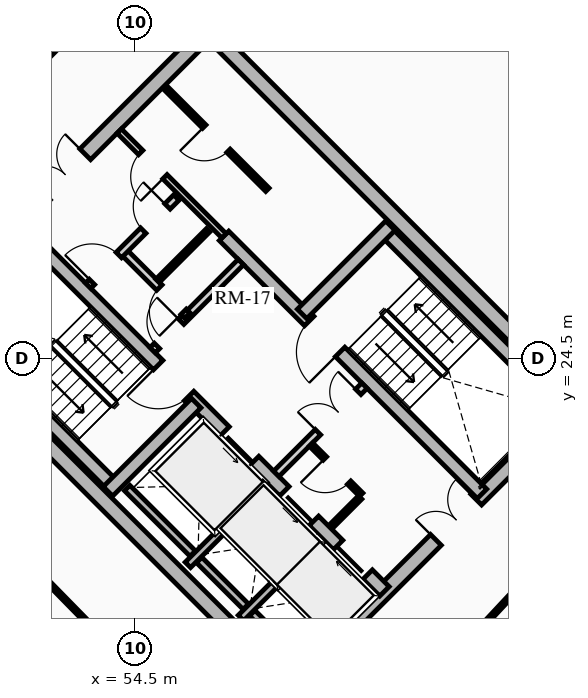
"""IFC4 building model, lengths in metres.
Left out: names, types, materials, properties, quantities, classifications, styles, units other than length and angle.
Written with IfcOpenShell. Run it as: python <this file> out.ifc"""

import sys

from ifc_helpers import new_model, si_unit, direction, frame, frame_2d, origin, place, context, subcontext, project, spatial, rectangle, extrude, source, transform, mapped, element, fill, save


model = new_model("IFC4")
c1 = context("Model", 3, precision=1e-05, world=origin(), true_north=direction((0.0, 1.0)))
c2 = subcontext(c1, "Body", "Model", "MODEL_VIEW")
j1 = project(units=[si_unit("LENGTHUNIT", "METRE"), si_unit("PLANEANGLEUNIT", "RADIAN")], contexts=[c1])
p1 = place(None, origin())
s1 = spatial("IfcSite", under=j1, at=p1, CompositionType="ELEMENT")
p2 = place(p1, origin())
s2 = spatial("IfcBuilding", under=s1, at=p2, CompositionType="ELEMENT")
p3 = place(p2, frame((0.0, 0.0, 186.52)))
s3 = spatial("IfcBuildingStorey", under=s2, at=p3, CompositionType="ELEMENT", Elevation=186.52)
for number, where, z_axis, x_axis in (
    (1, (58.702, 15.732, 0.0), (0.0, 0.0, 1.0), (-0.707, 0.707, 0.0)),
    (2, (66.268, 23.298, 0.0), (0.0, 0.0, 1.0), (-0.707, 0.707, 0.0)),
):
    element("IfcWall", number, at=place(p3, frame(where, z_axis=z_axis, x_axis=x_axis)), inside=s3, PredefinedType="SHEAR", context=c2, shape_type="SweptSolid", body=[
        extrude(rectangle(XDim=14.1, YDim=0.4, at=frame_2d((7.05, 0.0))), origin(), (0.0, 0.0, 1.0), 2.91),
    ])
p4 = place(p3, frame((58.561, 15.873, 0.0), z_axis=(0.0, 0.0, 1.0), x_axis=(0.707106781187, 0.707106781187, 0.0)))
e3 = element("IfcWall", 3, at=p4, inside=s3, PredefinedType="SHEAR", context=c2, shape_type="SweptSolid", body=[
    extrude(rectangle(XDim=10.7, YDim=0.4, at=frame_2d((5.35, 0.0))), origin(), (0.0, 0.0, 1.0), 2.91),
])
m1 = source(origin(), c2, "Body", "SweptSolid", [
    extrude(rectangle(XDim=1.5, YDim=2.02, at=frame_2d((0.75, 1.01))), frame((0.0, 0.21, 0.0), z_axis=(0.0, -1.0, 0.0), x_axis=(1.0, 0.0, 0.0)), (0.0, 0.0, 1.0), 0.42),
])
p5 = place(p4, frame((5.45, 0.0, 0.0)))
e4 = element("IfcOpeningElement", 4, at=p5, cuts=e3, PredefinedType="OPENING", context=c2, shape_type="MappedRepresentation", body=[
    mapped(m1, transform((0.0, 0.0, 0.0), x_axis=(1.0, 0.0, 0.0), y_axis=(0.0, 1.0, 0.0), z_axis=(0.0, 0.0, 1.0), scale=1.0)),
])
p6 = place(p3, frame((48.873, 25.561, 0.0), z_axis=(0.0, 0.0, 1.0), x_axis=(0.707106781187, 0.707106781187, 0.0)))
e5 = element("IfcWall", 5, at=p6, inside=s3, PredefinedType="SHEAR", context=c2, shape_type="SweptSolid", body=[
    extrude(rectangle(XDim=10.7, YDim=0.4, at=frame_2d((5.35, 0.0))), origin(), (0.0, 0.0, 1.0), 2.91),
])
p7 = place(p6, frame((4.6, 0.0, 0.0)))
e6 = element("IfcOpeningElement", 6, at=p7, cuts=e5, PredefinedType="OPENING", context=c2, shape_type="MappedRepresentation", body=[
    mapped(m1, transform((0.0, 0.0, 0.0), x_axis=(1.0, 0.0, 0.0), y_axis=(0.0, 1.0, 0.0), z_axis=(0.0, 0.0, 1.0), scale=1.0)),
])
p8 = place(p3, frame((61.06, 18.373, 0.0), z_axis=(0.0, 0.0, 1.0), x_axis=(-0.707106781187, 0.707106781187, 0.0)))
e7 = element("IfcWall", 7, at=p8, inside=s3, PredefinedType="SHEAR", context=c2, shape_type="SweptSolid", body=[
    extrude(rectangle(XDim=13.7, YDim=0.35, at=frame_2d((6.85, 0.0))), origin(), (0.0, 0.0, 1.0), 2.91),
])
m2 = source(origin(), c2, "Body", "SweptSolid", [
    extrude(rectangle(XDim=1.1, YDim=2.015, at=frame_2d((0.55, 1.007))), frame((0.0, 0.185, 0.0), z_axis=(0.0, -1.0, 0.0), x_axis=(1.0, 0.0, 0.0)), (0.0, 0.0, 1.0), 0.37),
])
p9 = place(p8, frame((4.85, 0.0, 0.0)))
e8 = element("IfcOpeningElement", 8, at=p9, cuts=e7, PredefinedType="OPENING", context=c2, shape_type="MappedRepresentation", body=[
    mapped(m2, transform((0.0, 0.0, 0.0), x_axis=(1.0, 0.0, 0.0), y_axis=(0.0, 1.0, 0.0), z_axis=(0.0, 0.0, 1.0), scale=1.0)),
])
p10 = place(p8, frame((0.625, 0.0, 0.0)))
e9 = element("IfcOpeningElement", 9, at=p10, cuts=e7, PredefinedType="OPENING", context=c2, shape_type="MappedRepresentation", body=[
    mapped(m2, transform((0.0, 0.0, 0.0), x_axis=(1.0, 0.0, 0.0), y_axis=(0.0, 1.0, 0.0), z_axis=(0.0, 0.0, 1.0), scale=1.0)),
])
p11 = place(p8, frame((2.625, 0.0, 0.0)))
e10 = element("IfcOpeningElement", 10, at=p11, cuts=e7, PredefinedType="OPENING", context=c2, shape_type="MappedRepresentation", body=[
    mapped(m2, transform((0.0, 0.0, 0.0), x_axis=(1.0, 0.0, 0.0), y_axis=(0.0, 1.0, 0.0), z_axis=(0.0, 0.0, 1.0), scale=1.0)),
])
m3 = source(origin(), c2, "Body", "SweptSolid", [
    extrude(rectangle(XDim=1.15, YDim=2.02, at=frame_2d((0.575, 1.01))), frame((0.0, 0.185, 0.0), z_axis=(0.0, -1.0, 0.0), x_axis=(1.0, 0.0, 0.0)), (0.0, 0.0, 1.0), 0.37),
])
p12 = place(p8, frame((7.27, 0.0, 0.0)))
e11 = element("IfcOpeningElement", 11, at=p12, cuts=e7, PredefinedType="OPENING", context=c2, shape_type="MappedRepresentation", body=[
    mapped(m3, transform((0.0, 0.0, 0.0), x_axis=(1.0, 0.0, 0.0), y_axis=(0.0, 1.0, 0.0), z_axis=(0.0, 0.0, 1.0), scale=1.0)),
])
p13 = place(p3, frame((63.627, 20.94, 0.0), z_axis=(0.0, 0.0, 1.0), x_axis=(-0.707119496762, 0.707094065383, 0.0)))
e12 = element("IfcWall", 12, at=p13, inside=s3, PredefinedType="SHEAR", context=c2, shape_type="SweptSolid", body=[
    extrude(rectangle(XDim=9.6, YDim=0.35, at=frame_2d((4.8, 0.0))), origin(), (0.0, 0.0, 1.0), 2.91),
])
p14 = place(p13, frame((5.28, 0.0, 0.0)))
e13 = element("IfcOpeningElement", 13, at=p14, cuts=e12, PredefinedType="OPENING", context=c2, shape_type="MappedRepresentation", body=[
    mapped(m3, transform((0.0, 0.0, 0.0), x_axis=(1.0, 0.0, 0.0), y_axis=(0.0, 1.0, 0.0), z_axis=(0.0, 0.0, 1.0), scale=1.0)),
])
p15 = place(p3, frame((53.922, 21.141, 0.0), z_axis=(0.0, 0.0, 1.0), x_axis=(-0.707106781187, 0.707106781187, 0.0)))
e14 = element("IfcWall", 14, at=p15, inside=s3, PredefinedType="SHEAR", context=c2, shape_type="SweptSolid", body=[
    extrude(rectangle(XDim=6.695, YDim=0.35, at=frame_2d((3.348, 0.0))), origin(), (0.0, 0.0, 1.0), 2.91),
])
p16 = place(p3, frame((53.784, 21.003, 0.0), z_axis=(0.0, 0.0, 1.0), x_axis=(0.707106781187, 0.707106781187, 0.0)))
e15 = element("IfcWall", 15, at=p16, inside=s3, PredefinedType="SHEAR", context=c2, shape_type="SweptSolid", body=[
    extrude(rectangle(XDim=3.285, YDim=0.35, at=frame_2d((1.643, 0.0))), origin(), (0.0, 0.0, 1.0), 2.91),
])
p17 = place(p3, frame((65.812, 23.125, 0.0), z_axis=(0.0, 0.0, 1.0), x_axis=(-0.707106781187, 0.707106781187, 0.0)))
e16 = element("IfcWall", 16, at=p17, inside=s3, PredefinedType="SHEAR", context=c2, shape_type="SweptSolid", body=[
    extrude(rectangle(XDim=6.695, YDim=0.35, at=frame_2d((3.348, 0.0))), origin(), (0.0, 0.0, 1.0), 2.91),
])
p18 = place(p3, frame((58.893, 25.674, 0.0), z_axis=(0.0, 0.0, 1.0), x_axis=(0.707106781187, 0.707106781187, 0.0)))
e17 = element("IfcWall", 17, at=p18, inside=s3, PredefinedType="SHEAR", context=c2, shape_type="SweptSolid", body=[
    extrude(rectangle(XDim=3.285, YDim=0.35, at=frame_2d((1.643, 0.0))), origin(), (0.0, 0.0, 1.0), 2.91),
])
p19 = place(p3, frame((55.888, 19.069, 0.0), z_axis=(0.0, 0.0, 1.0), x_axis=(0.707106781187, 0.707106781187, 0.0)))
e18 = element("IfcWall", 18, at=p19, inside=s3, PredefinedType="SHEAR", context=c2, shape_type="SweptSolid", body=[
    extrude(rectangle(XDim=2.97, YDim=0.2, at=frame_2d((1.485, 0.0))), origin(), (0.0, 0.0, 1.0), 2.91),
])
p20 = place(p3, frame((56.015, 19.366, 0.0), z_axis=(0.0, 0.0, 1.0), x_axis=(-0.707106781187, 0.707106781187, 0.0)))
e19 = element("IfcWall", 19, at=p20, inside=s3, PredefinedType="SHEAR", context=c2, shape_type="SweptSolid", body=[
    extrude(rectangle(XDim=2.44, YDim=0.2, at=frame_2d((1.22, 0.0))), origin(), (0.0, 0.0, 1.0), 2.91),
])
p21 = place(p3, frame((57.284, 17.673, 0.0), z_axis=(0.0, 0.0, 1.0), x_axis=(0.707147878904, 0.70706568108, 0.0)))
e20 = element("IfcWall", 20, at=p21, inside=s3, PredefinedType="SHEAR", context=c2, shape_type="SweptSolid", body=[
    extrude(rectangle(XDim=2.97, YDim=0.2, at=frame_2d((1.485, 0.0))), origin(), (0.0, 0.0, 1.0), 2.91),
])
p22 = place(p3, frame((57.412, 17.97, 0.0), z_axis=(0.0, 0.0, 1.0), x_axis=(-0.707106781187, 0.707106781187, 0.0)))
e21 = element("IfcWall", 21, at=p22, inside=s3, PredefinedType="SHEAR", context=c2, shape_type="SweptSolid", body=[
    extrude(rectangle(XDim=1.735, YDim=0.2, at=frame_2d((0.867, 0.0))), origin(), (0.0, 0.0, 1.0), 2.91),
])
p23 = place(p3, frame((58.737, 16.644, 0.0), z_axis=(0.0, 0.0, 1.0), x_axis=(-0.707032117043, 0.707181437447, 0.0)))
e22 = element("IfcWall", 22, at=p23, inside=s3, PredefinedType="SHEAR", context=c2, shape_type="SweptSolid", body=[
    extrude(rectangle(XDim=1.635, YDim=0.2, at=frame_2d((0.817, 0.0))), origin(), (0.0, 0.0, 1.0), 2.91),
])
p24 = place(p3, frame((58.214, 21.467, 0.0), z_axis=(0.0, 0.0, 1.0), x_axis=(0.707106781187, 0.707106781187, 0.0)))
e23 = element("IfcWall", 23, at=p24, inside=s3, PredefinedType="PARTITIONING", context=c2, shape_type="SweptSolid", body=[
    extrude(rectangle(XDim=3.28, YDim=0.2, at=frame_2d((1.64, 0.0))), origin(), (0.0, 0.0, 1.0), 2.675),
])
m4 = source(origin(), c2, "Body", "SweptSolid", [
    extrude(rectangle(XDim=1.5, YDim=2.02, at=frame_2d((0.75, 1.01))), frame((0.0, 0.11, 0.0), z_axis=(0.0, -1.0, 0.0), x_axis=(1.0, 0.0, 0.0)), (0.0, 0.0, 1.0), 0.22),
])
p25 = place(p24, frame((1.55, 0.0, 0.0)))
e24 = element("IfcOpeningElement", 24, at=p25, cuts=e23, PredefinedType="OPENING", context=c2, shape_type="MappedRepresentation", body=[
    mapped(m4, transform((0.0, 0.0, 0.0), x_axis=(1.0, 0.0, 0.0), y_axis=(0.0, 1.0, 0.0), z_axis=(0.0, 0.0, 1.0), scale=1.0)),
])
p26 = place(p3, frame((54.961, 24.719, 0.0), z_axis=(0.0, 0.0, 1.0), x_axis=(0.707106781187, 0.707106781187, 0.0)))
e25 = element("IfcWall", 25, at=p26, inside=s3, PredefinedType="PARTITIONING", context=c2, shape_type="SweptSolid", body=[
    extrude(rectangle(XDim=3.28, YDim=0.2, at=frame_2d((1.64, 0.0))), origin(), (0.0, 0.0, 1.0), 2.675),
])
m5 = source(origin(), c2, "Body", "SweptSolid", [
    extrude(rectangle(XDim=0.9, YDim=2.005, at=frame_2d((0.45, 1.002))), frame((0.0, 0.11, 0.0), z_axis=(0.0, -1.0, 0.0), x_axis=(1.0, 0.0, 0.0)), (0.0, 0.0, 1.0), 0.22),
])
p27 = place(p26, frame((0.16, 0.0, 0.0)))
e26 = element("IfcOpeningElement", 26, at=p27, cuts=e25, PredefinedType="OPENING", context=c2, shape_type="MappedRepresentation", body=[
    mapped(m5, transform((0.0, 0.0, 0.0), x_axis=(1.0, 0.0, 0.0), y_axis=(0.0, 1.0, 0.0), z_axis=(0.0, 0.0, 1.0), scale=1.0)),
])
p28 = place(p3, frame((55.874, 25.631, 0.0), z_axis=(0.0, 0.0, 1.0), x_axis=(-0.707157639372, 0.707055919343, 0.0)))
e27 = element("IfcWall", 27, at=p28, inside=s3, PredefinedType="PARTITIONING", context=c2, shape_type="SweptSolid", body=[
    extrude(rectangle(XDim=2.4, YDim=0.2, at=frame_2d((1.2, 0.0))), origin(), (0.0, 0.0, 1.0), 2.675),
])
p29 = place(p28, frame((0.14, 0.0, 0.0)))
e28 = element("IfcOpeningElement", 28, at=p29, cuts=e27, PredefinedType="OPENING", context=c2, shape_type="MappedRepresentation", body=[
    mapped(m5, transform((0.0, 0.0, 0.0), x_axis=(1.0, 0.0, 0.0), y_axis=(0.0, 1.0, 0.0), z_axis=(0.0, 0.0, 1.0), scale=1.0)),
])
p30 = place(p3, frame((53.264, 26.416, 0.0), z_axis=(0.0, 0.0, 1.0), x_axis=(0.707106781187, 0.707106781187, 0.0)))
e29 = element("IfcWall", 29, at=p30, inside=s3, PredefinedType="PARTITIONING", context=c2, shape_type="SweptSolid", body=[
    extrude(rectangle(XDim=3.28, YDim=0.2, at=frame_2d((1.64, 0.0))), origin(), (0.0, 0.0, 1.0), 2.675),
])
m6 = source(origin(), c2, "Body", "SweptSolid", [
    extrude(rectangle(XDim=1.0, YDim=2.015, at=frame_2d((0.5, 1.007))), frame((0.0, 0.11, 0.0), z_axis=(0.0, -1.0, 0.0), x_axis=(1.0, 0.0, 0.0)), (0.0, 0.0, 1.0), 0.22),
])
p31 = place(p30, frame((0.14, 0.0, 0.0)))
e30 = element("IfcOpeningElement", 30, at=p31, cuts=e29, PredefinedType="OPENING", context=c2, shape_type="MappedRepresentation", body=[
    mapped(m6, transform((0.0, 0.0, 0.0), x_axis=(1.0, 0.0, 0.0), y_axis=(0.0, 1.0, 0.0), z_axis=(0.0, 0.0, 1.0), scale=1.0)),
])
p32 = place(p30, frame((2.05, 0.0, 0.0)))
e31 = element("IfcOpeningElement", 31, at=p32, cuts=e29, PredefinedType="OPENING", context=c2, shape_type="MappedRepresentation", body=[
    mapped(m5, transform((0.0, 0.0, 0.0), x_axis=(1.0, 0.0, 0.0), y_axis=(0.0, 1.0, 0.0), z_axis=(0.0, 0.0, 1.0), scale=1.0)),
])
p33 = place(p3, frame((60.448, 20.915, 0.0), z_axis=(0.0, 0.0, 1.0), x_axis=(-0.707106781187, 0.707106781187, 0.0)))
e32 = element("IfcWall", 32, at=p33, inside=s3, PredefinedType="PARTITIONING", context=c2, shape_type="SweptSolid", body=[
    extrude(rectangle(XDim=1.87, YDim=0.125, at=frame_2d((0.935, 0.0))), origin(), (0.0, 0.0, 1.0), 2.675),
])
m7 = source(origin(), c2, "Body", "SweptSolid", [
    extrude(rectangle(XDim=0.9, YDim=2.005, at=frame_2d((0.45, 1.002))), frame((0.0, 0.073, 0.0), z_axis=(0.0, -1.0, 0.0), x_axis=(1.0, 0.0, 0.0)), (0.0, 0.0, 1.0), 0.145),
])
p34 = place(p33, frame((0.45, 0.0, 0.0)))
e33 = element("IfcOpeningElement", 33, at=p34, cuts=e32, PredefinedType="OPENING", context=c2, shape_type="MappedRepresentation", body=[
    mapped(m7, transform((0.0, 0.0, 0.0), x_axis=(1.0, 0.0, 0.0), y_axis=(0.0, 1.0, 0.0), z_axis=(0.0, 0.0, 1.0), scale=1.0)),
])
p35 = place(p3, frame((59.643, 20.066, 0.0), z_axis=(0.0, 0.0, 1.0), x_axis=(0.707106781187, 0.707106781187, 0.0)))
e34 = element("IfcWall", 34, at=p35, inside=s3, PredefinedType="PARTITIONING", context=c2, shape_type="SweptSolid", body=[
    extrude(rectangle(XDim=1.1, YDim=0.125, at=frame_2d((0.55, 0.0))), origin(), (0.0, 0.0, 1.0), 2.675),
])
p36 = place(p3, frame((55.089, 26.543, 0.0), z_axis=(0.0, 0.0, 1.0), x_axis=(0.707106781187, 0.707106781187, 0.0)))
e35 = element("IfcWall", 35, at=p36, inside=s3, PredefinedType="PARTITIONING", context=c2, shape_type="SweptSolid", body=[
    extrude(rectangle(XDim=1.88, YDim=0.125, at=frame_2d((0.94, 0.0))), origin(), (0.0, 0.0, 1.0), 2.675),
])
p37 = place(p3, frame((56.839, 27.728, 0.0), z_axis=(0.0, 0.0, 1.0), x_axis=(-0.707106781187, 0.707106781187, 0.0)))
e36 = element("IfcWall", 36, at=p37, inside=s3, PredefinedType="PARTITIONING", context=c2, shape_type="SweptSolid", body=[
    extrude(rectangle(XDim=3.9, YDim=0.16, at=frame_2d((1.95, 0.0))), origin(), (0.0, 0.0, 1.0), 2.675),
])
m8 = source(origin(), c2, "Body", "SweptSolid", [
    extrude(rectangle(XDim=0.9, YDim=2.005, at=frame_2d((0.45, 1.002))), frame((0.0, 0.09, 0.0), z_axis=(0.0, -1.0, 0.0), x_axis=(1.0, 0.0, 0.0)), (0.0, 0.0, 1.0), 0.18),
])
p38 = place(p37, frame((2.2, 0.0, 0.0)))
e37 = element("IfcOpeningElement", 37, at=p38, cuts=e36, PredefinedType="OPENING", context=c2, shape_type="MappedRepresentation", body=[
    mapped(m8, transform((0.0, 0.0, 0.0), x_axis=(1.0, 0.0, 0.0), y_axis=(0.0, 1.0, 0.0), z_axis=(0.0, 0.0, 1.0), scale=1.0)),
])
p39 = place(p3, frame((57.981, 28.941, 0.0), z_axis=(0.0, 0.0, 1.0), x_axis=(-0.707074823725, 0.707138737204, 0.0)))
e38 = element("IfcWall", 38, at=p39, inside=s3, PredefinedType="PARTITIONING", context=c2, shape_type="SweptSolid", body=[
    extrude(rectangle(XDim=3.82, YDim=0.125, at=frame_2d((1.91, 0.0))), origin(), (0.0, 0.0, 1.0), 2.675),
])
p40 = place(p39, frame((1.45, 0.0, 0.0)))
e39 = element("IfcOpeningElement", 39, at=p40, cuts=e38, PredefinedType="OPENING", context=c2, shape_type="MappedRepresentation", body=[
    mapped(m7, transform((0.0, 0.0, 0.0), x_axis=(1.0, 0.0, 0.0), y_axis=(0.0, 1.0, 0.0), z_axis=(0.0, 0.0, 1.0), scale=1.0)),
])
p41 = place(p3, frame((54.427, 34.683, 0.0), z_axis=(0.0, 0.0, 1.0), x_axis=(-0.704178989986, -0.710022499687, 0.0)))
e40 = element("IfcWall", 40, at=p41, inside=s3, PredefinedType="MOVABLE", context=c2, shape_type="SweptSolid", body=[
    extrude(rectangle(XDim=3.384, YDim=0.1, at=frame_2d((1.692, 0.0))), origin(), (0.0, 0.0, 1.0), 2.245),
])
p42 = place(p3, frame((51.914, 18.914, 0.0), z_axis=(0.0, 0.0, 1.0), x_axis=(0.699999313799, -0.714143515465, 0.0)))
e41 = element("IfcWall", 41, at=p42, inside=s3, PredefinedType="MOVABLE", context=c2, shape_type="SweptSolid", body=[
    extrude(rectangle(XDim=6.162, YDim=0.1, at=frame_2d((3.081, 0.0))), origin(), (0.0, 0.0, 1.0), 2.245),
])
p43 = place(p3, frame((62.903, 16.667, 0.0), z_axis=(0.0, 0.0, 1.0), x_axis=(0.682371947497, 0.731005147225, 0.0)))
e42 = element("IfcWall", 42, at=p43, inside=s3, PredefinedType="MOVABLE", context=c2, shape_type="SweptSolid", body=[
    extrude(rectangle(XDim=6.642, YDim=0.1, at=frame_2d((3.321, 0.0))), origin(), (0.0, 0.0, 1.0), 2.245),
])
m9 = source(origin(), c2, "Body", "SweptSolid", [
    extrude(rectangle(XDim=1.1, YDim=2.015, at=frame_2d((0.55, 1.007))), frame((0.0, 0.025, 0.0), z_axis=(0.0, -1.0, 0.0), x_axis=(1.0, 0.0, 0.0)), (0.0, 0.0, 1.0), 0.05),
])
p44 = place(p9, origin())
e43 = element("IfcDoor", 43, at=p44, inside=s3, OperationType="SLIDING_TO_LEFT", PredefinedType="DOOR", context=c2, shape_type="MappedRepresentation", body=[
    mapped(m9, transform((0.0, 0.0, 0.0), x_axis=(1.0, 0.0, 0.0), y_axis=(0.0, 1.0, 0.0), z_axis=(0.0, 0.0, 1.0), scale=1.0)),
])
fill(e8, e43)
p45 = place(p10, origin())
e44 = element("IfcDoor", 44, at=p45, inside=s3, OperationType="SLIDING_TO_RIGHT", PredefinedType="DOOR", context=c2, shape_type="MappedRepresentation", body=[
    mapped(m9, transform((0.0, 0.0, 0.0), x_axis=(1.0, 0.0, 0.0), y_axis=(0.0, 1.0, 0.0), z_axis=(0.0, 0.0, 1.0), scale=1.0)),
])
fill(e9, e44)
p46 = place(p11, origin())
e45 = element("IfcDoor", 45, at=p46, inside=s3, OperationType="SLIDING_TO_LEFT", PredefinedType="DOOR", context=c2, shape_type="MappedRepresentation", body=[
    mapped(m9, transform((0.0, 0.0, 0.0), x_axis=(1.0, 0.0, 0.0), y_axis=(0.0, 1.0, 0.0), z_axis=(0.0, 0.0, 1.0), scale=1.0)),
])
fill(e10, e45)
m10 = source(origin(), c2, "Body", "SweptSolid", [
    extrude(rectangle(XDim=1.15, YDim=2.02, at=frame_2d((0.575, 1.01))), frame((0.0, 0.025, 0.0), z_axis=(0.0, -1.0, 0.0), x_axis=(1.0, 0.0, 0.0)), (0.0, 0.0, 1.0), 0.05),
])
p47 = place(p12, origin())
e46 = element("IfcDoor", 46, at=p47, inside=s3, OperationType="SINGLE_SWING_RIGHT", PredefinedType="DOOR", context=c2, shape_type="MappedRepresentation", body=[
    mapped(m10, transform((0.0, 0.0, 0.0), x_axis=(1.0, 0.0, 0.0), y_axis=(0.0, 1.0, 0.0), z_axis=(0.0, 0.0, 1.0), scale=1.0)),
])
fill(e11, e46)
p48 = place(p14, origin())
e47 = element("IfcDoor", 47, at=p48, inside=s3, OperationType="SINGLE_SWING_LEFT", PredefinedType="DOOR", context=c2, shape_type="MappedRepresentation", body=[
    mapped(m10, transform((0.0, 0.0, 0.0), x_axis=(1.0, 0.0, 0.0), y_axis=(0.0, 1.0, 0.0), z_axis=(0.0, 0.0, 1.0), scale=1.0)),
])
fill(e13, e47)
m11 = source(origin(), c2, "Body", "SweptSolid", [
    extrude(rectangle(XDim=1.5, YDim=2.02, at=frame_2d((0.75, 1.01))), frame((0.0, 0.025, 0.0), z_axis=(0.0, -1.0, 0.0), x_axis=(1.0, 0.0, 0.0)), (0.0, 0.0, 1.0), 0.05),
])
p49 = place(p7, origin())
e48 = element("IfcDoor", 48, at=p49, inside=s3, OperationType="DOUBLE_DOOR_SINGLE_SWING", PredefinedType="DOOR", context=c2, shape_type="MappedRepresentation", body=[
    mapped(m11, transform((0.0, 0.0, 0.0), x_axis=(1.0, 0.0, 0.0), y_axis=(0.0, 1.0, 0.0), z_axis=(0.0, 0.0, 1.0), scale=1.0)),
])
fill(e6, e48)
p50 = place(p5, origin())
e49 = element("IfcDoor", 49, at=p50, inside=s3, OperationType="DOUBLE_DOOR_SINGLE_SWING", PredefinedType="DOOR", context=c2, shape_type="MappedRepresentation", body=[
    mapped(m11, transform((0.0, 0.0, 0.0), x_axis=(1.0, 0.0, 0.0), y_axis=(0.0, 1.0, 0.0), z_axis=(0.0, 0.0, 1.0), scale=1.0)),
])
fill(e4, e49)
p51 = place(p25, origin())
e50 = element("IfcDoor", 50, at=p51, inside=s3, OperationType="DOUBLE_DOOR_SINGLE_SWING", PredefinedType="DOOR", context=c2, shape_type="MappedRepresentation", body=[
    mapped(m11, transform((0.0, 0.0, 0.0), x_axis=(1.0, 0.0, 0.0), y_axis=(0.0, 1.0, 0.0), z_axis=(0.0, 0.0, 1.0), scale=1.0)),
])
fill(e24, e50)
m12 = source(origin(), c2, "Body", "SweptSolid", [
    extrude(rectangle(XDim=0.9, YDim=2.005, at=frame_2d((0.45, 1.002))), frame((0.0, 0.025, 0.0), z_axis=(0.0, -1.0, 0.0), x_axis=(1.0, 0.0, 0.0)), (0.0, 0.0, 1.0), 0.05),
])
p52 = place(p27, origin())
e51 = element("IfcDoor", 51, at=p52, inside=s3, OperationType="SINGLE_SWING_RIGHT", PredefinedType="DOOR", context=c2, shape_type="MappedRepresentation", body=[
    mapped(m12, transform((0.0, 0.0, 0.0), x_axis=(1.0, 0.0, 0.0), y_axis=(0.0, 1.0, 0.0), z_axis=(0.0, 0.0, 1.0), scale=1.0)),
])
fill(e26, e51)
m13 = source(origin(), c2, "Body", "SweptSolid", [
    extrude(rectangle(XDim=1.0, YDim=2.015, at=frame_2d((0.5, 1.007))), frame((0.0, 0.025, 0.0), z_axis=(0.0, -1.0, 0.0), x_axis=(1.0, 0.0, 0.0)), (0.0, 0.0, 1.0), 0.05),
])
p53 = place(p31, origin())
e52 = element("IfcDoor", 52, at=p53, inside=s3, OperationType="SINGLE_SWING_LEFT", PredefinedType="DOOR", context=c2, shape_type="MappedRepresentation", body=[
    mapped(m13, transform((0.0, 0.0, 0.0), x_axis=(1.0, 0.0, 0.0), y_axis=(0.0, 1.0, 0.0), z_axis=(0.0, 0.0, 1.0), scale=1.0)),
])
fill(e30, e52)
p54 = place(p34, origin())
e53 = element("IfcDoor", 53, at=p54, inside=s3, OperationType="SINGLE_SWING_RIGHT", PredefinedType="DOOR", context=c2, shape_type="MappedRepresentation", body=[
    mapped(m12, transform((0.0, 0.0, 0.0), x_axis=(1.0, 0.0, 0.0), y_axis=(0.0, 1.0, 0.0), z_axis=(0.0, 0.0, 1.0), scale=1.0)),
])
fill(e33, e53)
p55 = place(p29, origin())
e54 = element("IfcDoor", 54, at=p55, inside=s3, OperationType="SINGLE_SWING_LEFT", PredefinedType="DOOR", context=c2, shape_type="MappedRepresentation", body=[
    mapped(m12, transform((0.0, 0.0, 0.0), x_axis=(1.0, 0.0, 0.0), y_axis=(0.0, 1.0, 0.0), z_axis=(0.0, 0.0, 1.0), scale=1.0)),
])
fill(e28, e54)
p56 = place(p32, origin())
e55 = element("IfcDoor", 55, at=p56, inside=s3, OperationType="SINGLE_SWING_RIGHT", PredefinedType="DOOR", context=c2, shape_type="MappedRepresentation", body=[
    mapped(m12, transform((0.0, 0.0, 0.0), x_axis=(1.0, 0.0, 0.0), y_axis=(0.0, 1.0, 0.0), z_axis=(0.0, 0.0, 1.0), scale=1.0)),
])
fill(e31, e55)
p57 = place(p38, origin())
e56 = element("IfcDoor", 56, at=p57, inside=s3, OperationType="SINGLE_SWING_LEFT", PredefinedType="DOOR", context=c2, shape_type="MappedRepresentation", body=[
    mapped(m12, transform((0.0, 0.0, 0.0), x_axis=(1.0, 0.0, 0.0), y_axis=(0.0, 1.0, 0.0), z_axis=(0.0, 0.0, 1.0), scale=1.0)),
])
fill(e37, e56)
p58 = place(p40, origin())
e57 = element("IfcDoor", 57, at=p58, inside=s3, OperationType="SINGLE_SWING_RIGHT", PredefinedType="DOOR", context=c2, shape_type="MappedRepresentation", body=[
    mapped(m12, transform((0.0, 0.0, 0.0), x_axis=(1.0, 0.0, 0.0), y_axis=(0.0, 1.0, 0.0), z_axis=(0.0, 0.0, 1.0), scale=1.0)),
])
fill(e39, e57)
save(model, sys.argv[1])
